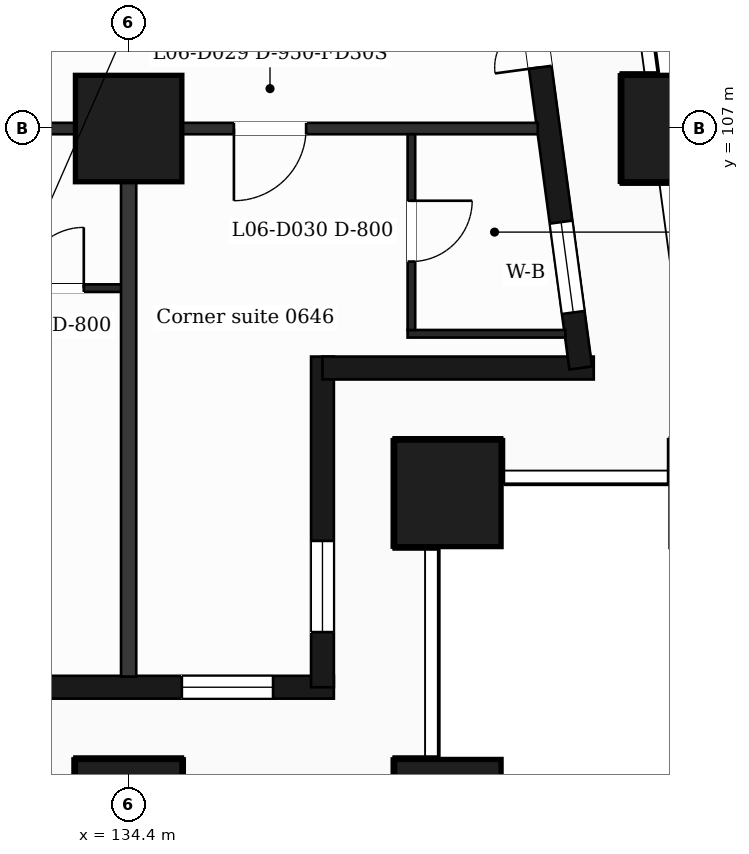
"""IFC4 building model, lengths in metres.
Left out: names, types, materials, properties, quantities, classifications, styles, units other than length and angle.
Written with IfcOpenShell. Run it as: python <this file> out.ifc"""

import sys

from ifc_helpers import new_model, si_unit, direction, frame, frame_2d, origin, origin_2d, place, context, subcontext, project, spatial, rectangle, extrude, element, fill, save


model = new_model("IFC4")
c1 = context("Model", 3, precision=1e-05, world=origin(), true_north=direction((0.0, 1.0)))
c2 = subcontext(c1, "Body", "Model", "MODEL_VIEW")
j1 = project(units=[si_unit("LENGTHUNIT", "METRE"), si_unit("PLANEANGLEUNIT", "RADIAN")], contexts=[c1])
p1 = place(None, origin())
s1 = spatial("IfcSite", under=j1, at=p1, CompositionType="ELEMENT")
p2 = place(p1, origin())
s2 = spatial("IfcBuilding", under=s1, at=p2, CompositionType="ELEMENT")
p3 = place(p2, frame((0.0, 0.0, 39.0)))
s3 = spatial("IfcBuildingStorey", under=s2, at=p3, CompositionType="ELEMENT", Elevation=39.0)
for number, where, z_axis, x_axis in (
    (1, (134.4, 98.0, -0.32), (0.0, 0.0, 1.0), (1.0, 0.0, 0.0)),
    (2, (138.6, 98.0, -0.32), (0.0, 0.0, 1.0), (1.0, 0.0, 0.0)),
    (3, (138.6, 102.2, -0.32), (0.0, 0.0, 1.0), (1.0, 0.0, 0.0)),
    (4, (134.4, 107.0, -0.32), (0.0, 0.0, 1.0), (1.0, 0.0, 0.0)),
    (5, (141.588, 107.0, -0.32), (0.0, 0.0, 1.0), (1.0, 0.0, 0.0)),
):
    element("IfcColumn", number, at=place(p3, frame(where, z_axis=z_axis, x_axis=x_axis)), inside=s3, PredefinedType="COLUMN", context=c2, shape_type="SweptSolid", body=[
        extrude(rectangle(XDim=1.4, YDim=1.4, at=origin_2d()), origin(), (0.0, 0.0, 1.0), 3.82),
    ])
p4 = place(p3, frame((89.85, 99.65, 0.0), z_axis=(0.0, 0.0, 1.0), x_axis=(1.0, 0.0, 0.0)))
e6 = element("IfcWall", 6, at=p4, inside=s3, PredefinedType="SOLIDWALL", context=c2, shape_type="SweptSolid", body=[
    extrude(rectangle(XDim=47.25, YDim=0.3, at=frame_2d((23.625, 0.0))), origin(), (0.0, 0.0, 1.0), 3.18),
])
p5 = place(p4, frame((0.725, 0.0, 0.9)))
e7 = element("IfcOpeningElement", 7, at=p5, cuts=e6, PredefinedType="OPENING", context=c2, shape_type="SweptSolid", body=[
    extrude(rectangle(XDim=1.2, YDim=2.1, at=frame_2d((0.6, 1.05))), frame((0.0, 0.16, 0.0), z_axis=(0.0, -1.0, 0.0), x_axis=(1.0, 0.0, 0.0)), (0.0, 0.0, 1.0), 0.32),
])
p6 = place(p4, frame((3.45, 0.0, 0.9)))
e8 = element("IfcOpeningElement", 8, at=p6, cuts=e6, PredefinedType="OPENING", context=c2, shape_type="SweptSolid", body=[
    extrude(rectangle(XDim=2.4, YDim=2.1, at=frame_2d((1.2, 1.05))), frame((0.0, 0.16, 0.0), z_axis=(0.0, -1.0, 0.0), x_axis=(1.0, 0.0, 0.0)), (0.0, 0.0, 1.0), 0.32),
])
p7 = place(p4, frame((8.25, 0.0, 0.9)))
e9 = element("IfcOpeningElement", 9, at=p7, cuts=e6, PredefinedType="OPENING", context=c2, shape_type="SweptSolid", body=[
    extrude(rectangle(XDim=1.2, YDim=2.1, at=frame_2d((0.6, 1.05))), frame((0.0, 0.16, 0.0), z_axis=(0.0, -1.0, 0.0), x_axis=(1.0, 0.0, 0.0)), (0.0, 0.0, 1.0), 0.32),
])
p8 = place(p4, frame((12.45, 0.0, 0.9)))
e10 = element("IfcOpeningElement", 10, at=p8, cuts=e6, PredefinedType="OPENING", context=c2, shape_type="SweptSolid", body=[
    extrude(rectangle(XDim=1.2, YDim=2.1, at=frame_2d((0.6, 1.05))), frame((0.0, 0.16, 0.0), z_axis=(0.0, -1.0, 0.0), x_axis=(1.0, 0.0, 0.0)), (0.0, 0.0, 1.0), 0.32),
])
p9 = place(p4, frame((16.05, 0.0, 0.9)))
e11 = element("IfcOpeningElement", 11, at=p9, cuts=e6, PredefinedType="OPENING", context=c2, shape_type="SweptSolid", body=[
    extrude(rectangle(XDim=2.4, YDim=2.1, at=frame_2d((1.2, 1.05))), frame((0.0, 0.16, 0.0), z_axis=(0.0, -1.0, 0.0), x_axis=(1.0, 0.0, 0.0)), (0.0, 0.0, 1.0), 0.32),
])
p10 = place(p4, frame((20.25, 0.0, 0.9)))
e12 = element("IfcOpeningElement", 12, at=p10, cuts=e6, PredefinedType="OPENING", context=c2, shape_type="SweptSolid", body=[
    extrude(rectangle(XDim=2.4, YDim=2.1, at=frame_2d((1.2, 1.05))), frame((0.0, 0.16, 0.0), z_axis=(0.0, -1.0, 0.0), x_axis=(1.0, 0.0, 0.0)), (0.0, 0.0, 1.0), 0.32),
])
p11 = place(p4, frame((25.05, 0.0, 0.0)))
e13 = element("IfcOpeningElement", 13, at=p11, cuts=e6, PredefinedType="OPENING", context=c2, shape_type="SweptSolid", body=[
    extrude(rectangle(XDim=1.2, YDim=2.4, at=frame_2d((0.6, 1.2))), frame((0.0, 0.16, 0.0), z_axis=(0.0, -1.0, 0.0), x_axis=(1.0, 0.0, 0.0)), (0.0, 0.0, 1.0), 0.32),
])
p12 = place(p4, frame((28.65, 0.0, 0.9)))
e14 = element("IfcOpeningElement", 14, at=p12, cuts=e6, PredefinedType="OPENING", context=c2, shape_type="SweptSolid", body=[
    extrude(rectangle(XDim=2.4, YDim=2.1, at=frame_2d((1.2, 1.05))), frame((0.0, 0.16, 0.0), z_axis=(0.0, -1.0, 0.0), x_axis=(1.0, 0.0, 0.0)), (0.0, 0.0, 1.0), 0.32),
])
p13 = place(p4, frame((32.85, 0.0, 0.9)))
e15 = element("IfcOpeningElement", 15, at=p13, cuts=e6, PredefinedType="OPENING", context=c2, shape_type="SweptSolid", body=[
    extrude(rectangle(XDim=2.4, YDim=2.1, at=frame_2d((1.2, 1.05))), frame((0.0, 0.16, 0.0), z_axis=(0.0, -1.0, 0.0), x_axis=(1.0, 0.0, 0.0)), (0.0, 0.0, 1.0), 0.32),
])
p14 = place(p4, frame((37.65, 0.0, 0.9)))
e16 = element("IfcOpeningElement", 16, at=p14, cuts=e6, PredefinedType="OPENING", context=c2, shape_type="SweptSolid", body=[
    extrude(rectangle(XDim=1.2, YDim=2.1, at=frame_2d((0.6, 1.05))), frame((0.0, 0.16, 0.0), z_axis=(0.0, -1.0, 0.0), x_axis=(1.0, 0.0, 0.0)), (0.0, 0.0, 1.0), 0.32),
])
p15 = place(p4, frame((41.85, 0.0, 0.9)))
e17 = element("IfcOpeningElement", 17, at=p15, cuts=e6, PredefinedType="OPENING", context=c2, shape_type="SweptSolid", body=[
    extrude(rectangle(XDim=1.2, YDim=2.1, at=frame_2d((0.6, 1.05))), frame((0.0, 0.16, 0.0), z_axis=(0.0, -1.0, 0.0), x_axis=(1.0, 0.0, 0.0)), (0.0, 0.0, 1.0), 0.32),
])
p16 = place(p4, frame((45.25, 0.0, 0.9)))
e18 = element("IfcOpeningElement", 18, at=p16, cuts=e6, PredefinedType="OPENING", context=c2, shape_type="SweptSolid", body=[
    extrude(rectangle(XDim=1.2, YDim=2.1, at=frame_2d((0.6, 1.05))), frame((0.0, 0.16, 0.0), z_axis=(0.0, -1.0, 0.0), x_axis=(1.0, 0.0, 0.0)), (0.0, 0.0, 1.0), 0.32),
])
p17 = place(p3, frame((136.95, 99.65, 0.0), z_axis=(0.0, 0.0, 1.0), x_axis=(0.0, 1.0, 0.0)))
e19 = element("IfcWall", 19, at=p17, inside=s3, PredefinedType="SOLIDWALL", context=c2, shape_type="SweptSolid", body=[
    extrude(rectangle(XDim=4.35, YDim=0.3, at=frame_2d((2.175, 0.0))), origin(), (0.0, 0.0, 1.0), 3.18),
])
p18 = place(p17, frame((0.725, 0.0, 0.9)))
e20 = element("IfcOpeningElement", 20, at=p18, cuts=e19, PredefinedType="OPENING", context=c2, shape_type="SweptSolid", body=[
    extrude(rectangle(XDim=1.2, YDim=2.1, at=frame_2d((0.6, 1.05))), frame((0.0, 0.16, 0.0), z_axis=(0.0, -1.0, 0.0), x_axis=(1.0, 0.0, 0.0)), (0.0, 0.0, 1.0), 0.32),
])
p19 = place(p3, frame((136.95, 103.85, 0.0), z_axis=(0.0, 0.0, 1.0), x_axis=(1.0, 0.0, 0.0)))
e21 = element("IfcWall", 21, at=p19, inside=s3, PredefinedType="SOLIDWALL", context=c2, shape_type="SweptSolid", body=[
    extrude(rectangle(XDim=3.569, YDim=0.3, at=frame_2d((1.785, 0.0))), origin(), (0.0, 0.0, 1.0), 3.18),
])
p20 = place(p3, frame((140.348, 103.85, 0.0), z_axis=(0.0, 0.0, 1.0), x_axis=(-0.133431549479, 0.991058031401, 0.0)))
e22 = element("IfcWall", 22, at=p20, inside=s3, PredefinedType="SOLIDWALL", context=c2, shape_type="SweptSolid", body=[
    extrude(rectangle(XDim=6.609, YDim=0.3, at=frame_2d((3.304, 0.0))), origin(), (0.0, 0.0, 1.0), 3.18),
])
p21 = place(p20, frame((0.737, 0.0, 0.9)))
e23 = element("IfcOpeningElement", 23, at=p21, cuts=e22, PredefinedType="OPENING", context=c2, shape_type="SweptSolid", body=[
    extrude(rectangle(XDim=1.2, YDim=2.1, at=frame_2d((0.6, 1.05))), frame((0.0, 0.16, 0.0), z_axis=(0.0, -1.0, 0.0), x_axis=(1.0, 0.0, 0.0)), (0.0, 0.0, 1.0), 0.32),
])
p22 = place(p20, frame((3.991, 0.0, 0.0)))
e24 = element("IfcOpeningElement", 24, at=p22, cuts=e22, PredefinedType="OPENING", context=c2, shape_type="SweptSolid", body=[
    extrude(rectangle(XDim=1.2, YDim=2.4, at=frame_2d((0.6, 1.2))), frame((0.0, 0.16, 0.0), z_axis=(0.0, -1.0, 0.0), x_axis=(1.0, 0.0, 0.0)), (0.0, 0.0, 1.0), 0.32),
])
p23 = place(p3, frame((138.07, 104.3, 0.0), z_axis=(0.0, 0.0, 1.0), x_axis=(1.0, 0.0, 0.0)))
e25 = element("IfcWall", 25, at=p23, inside=s3, PredefinedType="PARTITIONING", context=c2, shape_type="SweptSolid", body=[
    extrude(rectangle(XDim=2.076, YDim=0.1, at=frame_2d((1.038, 0.0))), origin(), (0.0, 0.0, 1.0), 3.18),
])
p24 = place(p3, frame((132.25, 104.9, 0.0), z_axis=(0.0, 0.0, 1.0), x_axis=(1.0, 0.0, 0.0)))
e26 = element("IfcWall", 26, at=p24, inside=s3, PredefinedType="PARTITIONING", context=c2, shape_type="SweptSolid", body=[
    extrude(rectangle(XDim=2.15, YDim=0.1, at=frame_2d((1.075, 0.0))), origin(), (0.0, 0.0, 1.0), 3.18),
])
p25 = place(p24, frame((0.76, 0.0, 0.0)))
e27 = element("IfcOpeningElement", 27, at=p25, cuts=e26, PredefinedType="OPENING", context=c2, shape_type="SweptSolid", body=[
    extrude(rectangle(XDim=0.8, YDim=2.1, at=frame_2d((0.4, 1.05))), frame((0.0, 0.06, 0.0), z_axis=(0.0, -1.0, 0.0), x_axis=(1.0, 0.0, 0.0)), (0.0, 0.0, 1.0), 0.12),
])
p26 = place(p3, frame((87.018, 107.0, 0.0), z_axis=(0.0, 0.0, 1.0), x_axis=(1.0, 0.0, 0.0)))
e28 = element("IfcWall", 28, at=p26, inside=s3, PredefinedType="PARTITIONING", context=c2, shape_type="SweptSolid", body=[
    extrude(rectangle(XDim=52.765, YDim=0.15, at=frame_2d((26.382, 0.0))), origin(), (0.0, 0.0, 1.0), 3.18),
])
p27 = place(p26, frame((1.032, 0.0, 0.0)))
e29 = element("IfcOpeningElement", 29, at=p27, cuts=e28, PredefinedType="OPENING", context=c2, shape_type="SweptSolid", body=[
    extrude(rectangle(XDim=0.95, YDim=2.1, at=frame_2d((0.475, 1.05))), frame((0.0, 0.085, 0.0), z_axis=(0.0, -1.0, 0.0), x_axis=(1.0, 0.0, 0.0)), (0.0, 0.0, 1.0), 0.17),
])
p28 = place(p26, frame((6.369, 0.0, 0.0)))
e30 = element("IfcOpeningElement", 30, at=p28, cuts=e28, PredefinedType="OPENING", context=c2, shape_type="SweptSolid", body=[
    extrude(rectangle(XDim=0.95, YDim=2.1, at=frame_2d((0.475, 1.05))), frame((0.0, 0.085, 0.0), z_axis=(0.0, -1.0, 0.0), x_axis=(1.0, 0.0, 0.0)), (0.0, 0.0, 1.0), 0.17),
])
p29 = place(p26, frame((10.952, 0.0, 0.0)))
e31 = element("IfcOpeningElement", 31, at=p29, cuts=e28, PredefinedType="OPENING", context=c2, shape_type="SweptSolid", body=[
    extrude(rectangle(XDim=0.95, YDim=2.1, at=frame_2d((0.475, 1.05))), frame((0.0, 0.085, 0.0), z_axis=(0.0, -1.0, 0.0), x_axis=(1.0, 0.0, 0.0)), (0.0, 0.0, 1.0), 0.17),
])
p30 = place(p26, frame((16.045, 0.0, 0.0)))
e32 = element("IfcOpeningElement", 32, at=p30, cuts=e28, PredefinedType="OPENING", context=c2, shape_type="SweptSolid", body=[
    extrude(rectangle(XDim=0.95, YDim=2.1, at=frame_2d((0.475, 1.05))), frame((0.0, 0.085, 0.0), z_axis=(0.0, -1.0, 0.0), x_axis=(1.0, 0.0, 0.0)), (0.0, 0.0, 1.0), 0.17),
])
p31 = place(p26, frame((20.245, 0.0, 0.0)))
e33 = element("IfcOpeningElement", 33, at=p31, cuts=e28, PredefinedType="OPENING", context=c2, shape_type="SweptSolid", body=[
    extrude(rectangle(XDim=0.95, YDim=2.1, at=frame_2d((0.475, 1.05))), frame((0.0, 0.085, 0.0), z_axis=(0.0, -1.0, 0.0), x_axis=(1.0, 0.0, 0.0)), (0.0, 0.0, 1.0), 0.17),
])
p32 = place(p26, frame((24.969, 0.0, 0.0)))
e34 = element("IfcOpeningElement", 34, at=p32, cuts=e28, PredefinedType="OPENING", context=c2, shape_type="SweptSolid", body=[
    extrude(rectangle(XDim=0.95, YDim=2.1, at=frame_2d((0.475, 1.05))), frame((0.0, 0.085, 0.0), z_axis=(0.0, -1.0, 0.0), x_axis=(1.0, 0.0, 0.0)), (0.0, 0.0, 1.0), 0.17),
])
p33 = place(p26, frame((26.807, 0.0, 0.0)))
e35 = element("IfcOpeningElement", 35, at=p33, cuts=e28, PredefinedType="OPENING", context=c2, shape_type="SweptSolid", body=[
    extrude(rectangle(XDim=0.95, YDim=2.1, at=frame_2d((0.475, 1.05))), frame((0.0, 0.085, 0.0), z_axis=(0.0, -1.0, 0.0), x_axis=(1.0, 0.0, 0.0)), (0.0, 0.0, 1.0), 0.17),
])
p34 = place(p26, frame((31.952, 0.0, 0.0)))
e36 = element("IfcOpeningElement", 36, at=p34, cuts=e28, PredefinedType="OPENING", context=c2, shape_type="SweptSolid", body=[
    extrude(rectangle(XDim=0.95, YDim=2.1, at=frame_2d((0.475, 1.05))), frame((0.0, 0.085, 0.0), z_axis=(0.0, -1.0, 0.0), x_axis=(1.0, 0.0, 0.0)), (0.0, 0.0, 1.0), 0.17),
])
p35 = place(p26, frame((40.795, 0.0, 0.0)))
e37 = element("IfcOpeningElement", 37, at=p35, cuts=e28, PredefinedType="OPENING", context=c2, shape_type="SweptSolid", body=[
    extrude(rectangle(XDim=0.95, YDim=2.1, at=frame_2d((0.475, 1.05))), frame((0.0, 0.085, 0.0), z_axis=(0.0, -1.0, 0.0), x_axis=(1.0, 0.0, 0.0)), (0.0, 0.0, 1.0), 0.17),
])
p36 = place(p26, frame((43.644, 0.0, 0.0)))
e38 = element("IfcOpeningElement", 38, at=p36, cuts=e28, PredefinedType="OPENING", context=c2, shape_type="SweptSolid", body=[
    extrude(rectangle(XDim=0.95, YDim=2.1, at=frame_2d((0.475, 1.05))), frame((0.0, 0.085, 0.0), z_axis=(0.0, -1.0, 0.0), x_axis=(1.0, 0.0, 0.0)), (0.0, 0.0, 1.0), 0.17),
])
p37 = place(p26, frame((48.767, 0.0, 0.0)))
e39 = element("IfcOpeningElement", 39, at=p37, cuts=e28, PredefinedType="OPENING", context=c2, shape_type="SweptSolid", body=[
    extrude(rectangle(XDim=0.95, YDim=2.1, at=frame_2d((0.475, 1.05))), frame((0.0, 0.085, 0.0), z_axis=(0.0, -1.0, 0.0), x_axis=(1.0, 0.0, 0.0)), (0.0, 0.0, 1.0), 0.17),
])
p38 = place(p3, frame((134.4, 99.79, 0.0), z_axis=(0.0, 0.0, 1.0), x_axis=(0.0, 1.0, 0.0)))
e40 = element("IfcWall", 40, at=p38, inside=s3, PredefinedType="PARTITIONING", context=c2, shape_type="SweptSolid", body=[
    extrude(rectangle(XDim=7.135, YDim=0.2, at=frame_2d((3.567, 0.0))), origin(), (0.0, 0.0, 1.0), 3.18),
])
p39 = place(p3, frame((138.12, 104.35, 0.0), z_axis=(0.0, 0.0, 1.0), x_axis=(0.0, 1.0, 0.0)))
e41 = element("IfcWall", 41, at=p39, inside=s3, PredefinedType="PARTITIONING", context=c2, shape_type="SweptSolid", body=[
    extrude(rectangle(XDim=2.575, YDim=0.1, at=frame_2d((1.288, 0.0))), origin(), (0.0, 0.0, 1.0), 3.18),
])
p40 = place(p39, frame((0.9, 0.0, 0.0)))
e42 = element("IfcOpeningElement", 42, at=p40, cuts=e41, PredefinedType="OPENING", context=c2, shape_type="SweptSolid", body=[
    extrude(rectangle(XDim=0.8, YDim=2.1, at=frame_2d((0.4, 1.05))), frame((0.0, 0.06, 0.0), z_axis=(0.0, -1.0, 0.0), x_axis=(1.0, 0.0, 0.0)), (0.0, 0.0, 1.0), 0.12),
])
p41 = place(p16, origin())
e43 = element("IfcWindow", 43, at=p41, inside=s3, PartitioningType="SINGLE_PANEL", PredefinedType="WINDOW", context=c2, shape_type="SweptSolid", body=[
    extrude(rectangle(XDim=1.2, YDim=2.1, at=frame_2d((0.6, 1.05))), frame((0.0, 0.03, 0.0), z_axis=(0.0, -1.0, 0.0), x_axis=(1.0, 0.0, 0.0)), (0.0, 0.0, 1.0), 0.06),
])
fill(e18, e43)
p42 = place(p18, origin())
e44 = element("IfcWindow", 44, at=p42, inside=s3, PartitioningType="SINGLE_PANEL", PredefinedType="WINDOW", context=c2, shape_type="SweptSolid", body=[
    extrude(rectangle(XDim=1.2, YDim=2.1, at=frame_2d((0.6, 1.05))), frame((0.0, 0.03, 0.0), z_axis=(0.0, -1.0, 0.0), x_axis=(1.0, 0.0, 0.0)), (0.0, 0.0, 1.0), 0.06),
])
fill(e20, e44)
p43 = place(p21, origin())
e45 = element("IfcWindow", 45, at=p43, inside=s3, PartitioningType="SINGLE_PANEL", PredefinedType="WINDOW", context=c2, shape_type="SweptSolid", body=[
    extrude(rectangle(XDim=1.2, YDim=2.1, at=frame_2d((0.6, 1.05))), frame((0.0, 0.03, 0.0), z_axis=(0.0, -1.0, 0.0), x_axis=(1.0, 0.0, 0.0)), (0.0, 0.0, 1.0), 0.06),
])
fill(e23, e45)
p44 = place(p22, origin())
e46 = element("IfcDoor", 46, at=p44, inside=s3, OperationType="DOUBLE_DOOR_SINGLE_SWING", PredefinedType="DOOR", context=c2, shape_type="SweptSolid", body=[
    extrude(rectangle(XDim=1.2, YDim=2.4, at=frame_2d((0.6, 1.2))), frame((0.0, 0.025, 0.0), z_axis=(0.0, -1.0, 0.0), x_axis=(1.0, 0.0, 0.0)), (0.0, 0.0, 1.0), 0.05),
])
fill(e24, e46)
p45 = place(p25, origin())
e47 = element("IfcDoor", 47, at=p45, inside=s3, OperationType="SINGLE_SWING_RIGHT", PredefinedType="DOOR", context=c2, shape_type="SweptSolid", body=[
    extrude(rectangle(XDim=0.8, YDim=2.1, at=frame_2d((0.4, 1.05))), frame((0.0, 0.025, 0.0), z_axis=(0.0, -1.0, 0.0), x_axis=(1.0, 0.0, 0.0)), (0.0, 0.0, 1.0), 0.05),
])
fill(e27, e47)
p46 = place(p37, origin())
e48 = element("IfcDoor", 48, at=p46, inside=s3, OperationType="SINGLE_SWING_LEFT", PredefinedType="DOOR", context=c2, shape_type="SweptSolid", body=[
    extrude(rectangle(XDim=0.95, YDim=2.1, at=frame_2d((0.475, 1.05))), frame((0.0, 0.025, 0.0), z_axis=(0.0, -1.0, 0.0), x_axis=(1.0, 0.0, 0.0)), (0.0, 0.0, 1.0), 0.05),
])
fill(e39, e48)
p47 = place(p40, origin())
e49 = element("IfcDoor", 49, at=p47, inside=s3, OperationType="SINGLE_SWING_RIGHT", PredefinedType="DOOR", context=c2, shape_type="SweptSolid", body=[
    extrude(rectangle(XDim=0.8, YDim=2.1, at=frame_2d((0.4, 1.05))), frame((0.0, 0.025, 0.0), z_axis=(0.0, -1.0, 0.0), x_axis=(1.0, 0.0, 0.0)), (0.0, 0.0, 1.0), 0.05),
])
fill(e42, e49)
save(model, sys.argv[1])
